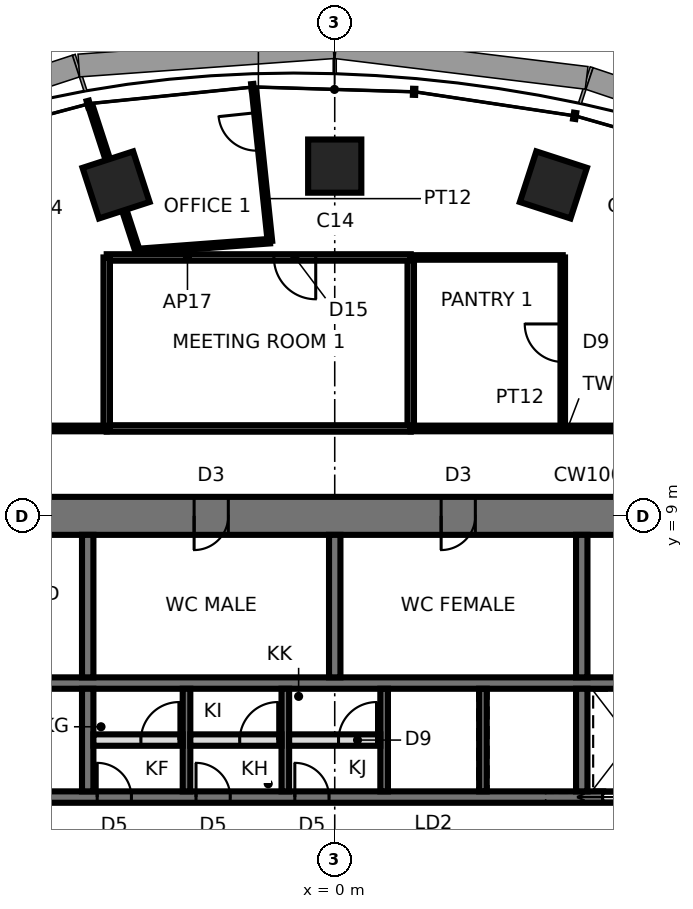
"""IFC4 building model, lengths in metres.
Left out: names, types, materials, properties, quantities, classifications, styles, units other than length and angle.
Written with IfcOpenShell. Run it as: python <this file> out.ifc"""

import sys

from ifc_helpers import new_model, si_unit, direction, frame, frame_2d, origin, origin_2d, place, context, subcontext, project, spatial, rectangle, extrude, element, fill, save


model = new_model("IFC4")
c1 = context("Model", 3, precision=1e-05, world=origin(), true_north=direction((0.0, 1.0)))
c2 = subcontext(c1, "Body", "Model", "MODEL_VIEW")
j1 = project(units=[si_unit("LENGTHUNIT", "METRE"), si_unit("PLANEANGLEUNIT", "RADIAN")], contexts=[c1])
p1 = place(None, origin())
s1 = spatial("IfcSite", under=j1, at=p1, CompositionType="ELEMENT")
p2 = place(p1, origin())
s2 = spatial("IfcBuilding", under=s1, at=p2, CompositionType="ELEMENT")
p3 = place(p2, frame((0.0, 0.0, 226.7)))
s3 = spatial("IfcBuildingStorey", under=s2, at=p3, CompositionType="ELEMENT", Elevation=226.7)
for number, where, z_axis, x_axis in (
    (1, (5.754, 17.708, 0.0), (0.0, 0.0, 1.0), (0.309, 0.951, 0.0)),
    (2, (0.0, 18.204, 0.0), (0.0, 0.0, 1.0), (0.0, 1.0, 0.0)),
    (3, (-5.754, 17.708, 0.0), (0.0, 0.0, 1.0), (-0.309, 0.951, 0.0)),
):
    element("IfcColumn", number, at=place(p3, frame(where, z_axis=z_axis, x_axis=x_axis)), inside=s3, PredefinedType="COLUMN", context=c2, shape_type="SweptSolid", body=[
        extrude(rectangle(XDim=1.4, YDim=1.4, at=origin_2d()), origin(), (0.0, 0.0, 1.0), 3.9),
    ])
p4 = place(p3, frame((13.2, 9.0, 0.0), z_axis=(0.0, 0.0, 1.0), x_axis=(-1.0, 0.0, 0.0)))
e4 = element("IfcWall", 4, at=p4, inside=s3, PredefinedType="SHEAR", context=c2, shape_type="SweptSolid", body=[
    extrude(rectangle(XDim=26.4, YDim=1.0, at=frame_2d((13.2, 0.0))), origin(), (0.0, 0.0, 1.0), 3.9),
])
p5 = place(p4, frame((2.65, 0.0, 0.0)))
e5 = element("IfcOpeningElement", 5, at=p5, cuts=e4, PredefinedType="OPENING", context=c2, shape_type="SweptSolid", body=[
    extrude(rectangle(XDim=0.9, YDim=2.1, at=frame_2d((0.45, 1.05))), frame((0.0, 0.51, 0.0), z_axis=(0.0, -1.0, 0.0), x_axis=(1.0, 0.0, 0.0)), (0.0, 0.0, 1.0), 1.02),
])
p6 = place(p4, frame((9.5, 0.0, 0.0)))
e6 = element("IfcOpeningElement", 6, at=p6, cuts=e4, PredefinedType="OPENING", context=c2, shape_type="SweptSolid", body=[
    extrude(rectangle(XDim=0.9, YDim=2.1, at=frame_2d((0.45, 1.05))), frame((0.0, 0.51, 0.0), z_axis=(0.0, -1.0, 0.0), x_axis=(1.0, 0.0, 0.0)), (0.0, 0.0, 1.0), 1.02),
])
p7 = place(p4, frame((16.0, 0.0, 0.0)))
e7 = element("IfcOpeningElement", 7, at=p7, cuts=e4, PredefinedType="OPENING", context=c2, shape_type="SweptSolid", body=[
    extrude(rectangle(XDim=0.9, YDim=2.1, at=frame_2d((0.45, 1.05))), frame((0.0, 0.51, 0.0), z_axis=(0.0, -1.0, 0.0), x_axis=(1.0, 0.0, 0.0)), (0.0, 0.0, 1.0), 1.02),
])
p8 = place(p4, frame((21.25, 0.0, 0.0)))
e8 = element("IfcOpeningElement", 8, at=p8, cuts=e4, PredefinedType="OPENING", context=c2, shape_type="SweptSolid", body=[
    extrude(rectangle(XDim=0.9, YDim=2.1, at=frame_2d((0.45, 1.05))), frame((0.0, 0.51, 0.0), z_axis=(0.0, -1.0, 0.0), x_axis=(1.0, 0.0, 0.0)), (0.0, 0.0, 1.0), 1.02),
])
p9 = place(p4, frame((24.8, 0.0, 0.0)))
e9 = element("IfcOpeningElement", 9, at=p9, cuts=e4, PredefinedType="OPENING", context=c2, shape_type="SweptSolid", body=[
    extrude(rectangle(XDim=1.0, YDim=2.1, at=frame_2d((0.5, 1.05))), frame((0.0, 0.51, 0.0), z_axis=(0.0, -1.0, 0.0), x_axis=(1.0, 0.0, 0.0)), (0.0, 0.0, 1.0), 1.02),
])
p10 = place(p3, frame((-13.2, 1.6, 0.0), z_axis=(0.0, 0.0, 1.0), x_axis=(1.0, 0.0, 0.0)))
e10 = element("IfcWall", 10, at=p10, inside=s3, PredefinedType="SHEAR", context=c2, shape_type="SweptSolid", body=[
    extrude(rectangle(XDim=26.4, YDim=0.3, at=frame_2d((13.2, 0.0))), origin(), (0.0, 0.0, 1.0), 3.9),
])
p11 = place(p10, frame((0.25, 0.0, 0.0)))
e11 = element("IfcOpeningElement", 11, at=p11, cuts=e10, PredefinedType="OPENING", context=c2, shape_type="SweptSolid", body=[
    extrude(rectangle(XDim=1.0, YDim=2.1, at=frame_2d((0.5, 1.05))), frame((0.0, 0.16, 0.0), z_axis=(0.0, -1.0, 0.0), x_axis=(1.0, 0.0, 0.0)), (0.0, 0.0, 1.0), 0.32),
])
p12 = place(p10, frame((23.05, 0.0, 0.0)))
e12 = element("IfcOpeningElement", 12, at=p12, cuts=e10, PredefinedType="OPENING", context=c2, shape_type="SweptSolid", body=[
    extrude(rectangle(XDim=1.1, YDim=2.3, at=frame_2d((0.55, 1.15))), frame((0.0, 0.16, 0.0), z_axis=(0.0, -1.0, 0.0), x_axis=(1.0, 0.0, 0.0)), (0.0, 0.0, 1.0), 0.32),
])
p13 = place(p10, frame((20.25, 0.0, 0.0)))
e13 = element("IfcOpeningElement", 13, at=p13, cuts=e10, PredefinedType="OPENING", context=c2, shape_type="SweptSolid", body=[
    extrude(rectangle(XDim=1.5, YDim=2.4, at=frame_2d((0.75, 1.2))), frame((0.0, 0.16, 0.0), z_axis=(0.0, -1.0, 0.0), x_axis=(1.0, 0.0, 0.0)), (0.0, 0.0, 1.0), 0.32),
])
p14 = place(p10, frame((6.95, 0.0, 0.0)))
e14 = element("IfcOpeningElement", 14, at=p14, cuts=e10, PredefinedType="OPENING", context=c2, shape_type="SweptSolid", body=[
    extrude(rectangle(XDim=0.9, YDim=2.1, at=frame_2d((0.45, 1.05))), frame((0.0, 0.16, 0.0), z_axis=(0.0, -1.0, 0.0), x_axis=(1.0, 0.0, 0.0)), (0.0, 0.0, 1.0), 0.32),
])
p15 = place(p10, frame((9.55, 0.0, 0.0)))
e15 = element("IfcOpeningElement", 15, at=p15, cuts=e10, PredefinedType="OPENING", context=c2, shape_type="SweptSolid", body=[
    extrude(rectangle(XDim=0.9, YDim=2.1, at=frame_2d((0.45, 1.05))), frame((0.0, 0.16, 0.0), z_axis=(0.0, -1.0, 0.0), x_axis=(1.0, 0.0, 0.0)), (0.0, 0.0, 1.0), 0.32),
])
p16 = place(p10, frame((12.15, 0.0, 0.0)))
e16 = element("IfcOpeningElement", 16, at=p16, cuts=e10, PredefinedType="OPENING", context=c2, shape_type="SweptSolid", body=[
    extrude(rectangle(XDim=0.9, YDim=2.1, at=frame_2d((0.45, 1.05))), frame((0.0, 0.16, 0.0), z_axis=(0.0, -1.0, 0.0), x_axis=(1.0, 0.0, 0.0)), (0.0, 0.0, 1.0), 0.32),
])
p17 = place(p10, frame((25.45, 0.0, 0.0)))
e17 = element("IfcOpeningElement", 17, at=p17, cuts=e10, PredefinedType="OPENING", context=c2, shape_type="SweptSolid", body=[
    extrude(rectangle(XDim=0.9, YDim=2.1, at=frame_2d((0.45, 1.05))), frame((0.0, 0.16, 0.0), z_axis=(0.0, -1.0, 0.0), x_axis=(1.0, 0.0, 0.0)), (0.0, 0.0, 1.0), 0.32),
])
p18 = place(p3, frame((-13.2, 4.6, 0.0), z_axis=(0.0, 0.0, 1.0), x_axis=(1.0, 0.0, 0.0)))
e18 = element("IfcWall", 18, at=p18, inside=s3, PredefinedType="SHEAR", context=c2, shape_type="SweptSolid", body=[
    extrude(rectangle(XDim=26.4, YDim=0.3, at=frame_2d((13.2, 0.0))), origin(), (0.0, 0.0, 1.0), 3.9),
])
p19 = place(p3, frame((-6.5, 1.75, 0.0), z_axis=(0.0, 0.0, 1.0), x_axis=(0.0, 1.0, 0.0)))
e19 = element("IfcWall", 19, at=p19, inside=s3, PredefinedType="SHEAR", context=c2, shape_type="SweptSolid", body=[
    extrude(rectangle(XDim=2.7, YDim=0.3, at=frame_2d((1.35, 0.0))), origin(), (0.0, 0.0, 1.0), 3.9),
])
p20 = place(p3, frame((-6.5, 4.75, 0.0), z_axis=(0.0, 0.0, 1.0), x_axis=(0.0, 1.0, 0.0)))
e20 = element("IfcWall", 20, at=p20, inside=s3, PredefinedType="SHEAR", context=c2, shape_type="SweptSolid", body=[
    extrude(rectangle(XDim=3.75, YDim=0.3, at=frame_2d((1.875, 0.0))), origin(), (0.0, 0.0, 1.0), 3.9),
])
p21 = place(p3, frame((6.5, 1.75, 0.0), z_axis=(0.0, 0.0, 1.0), x_axis=(0.0, 1.0, 0.0)))
e21 = element("IfcWall", 21, at=p21, inside=s3, PredefinedType="SHEAR", context=c2, shape_type="SweptSolid", body=[
    extrude(rectangle(XDim=2.7, YDim=0.3, at=frame_2d((1.35, 0.0))), origin(), (0.0, 0.0, 1.0), 3.9),
])
p22 = place(p3, frame((6.5, 4.75, 0.0), z_axis=(0.0, 0.0, 1.0), x_axis=(0.0, 1.0, 0.0)))
e22 = element("IfcWall", 22, at=p22, inside=s3, PredefinedType="SHEAR", context=c2, shape_type="SweptSolid", body=[
    extrude(rectangle(XDim=3.75, YDim=0.3, at=frame_2d((1.875, 0.0))), origin(), (0.0, 0.0, 1.0), 3.9),
])
for number, where, z_axis, x_axis in (
    (23, (-3.9, 1.75, 0.0), (0.0, 0.0, 1.0), (0.0, 1.0, 0.0)),
    (24, (-1.3, 1.75, 0.0), (0.0, 0.0, 1.0), (0.0, 1.0, 0.0)),
    (25, (1.3, 1.75, 0.0), (0.0, 0.0, 1.0), (0.0, 1.0, 0.0)),
    (26, (3.9, 1.75, 0.0), (0.0, 0.0, 1.0), (0.0, 1.0, 0.0)),
):
    element("IfcWall", number, at=place(p3, frame(where, z_axis=z_axis, x_axis=x_axis)), inside=s3, PredefinedType="SHEAR", context=c2, shape_type="SweptSolid", body=[
        extrude(rectangle(XDim=2.7, YDim=0.2, at=frame_2d((1.35, 0.0))), origin(), (0.0, 0.0, 1.0), 3.9),
    ])
p23 = place(p3, frame((0.0, 4.75, 0.0), z_axis=(0.0, 0.0, 1.0), x_axis=(0.0, 1.0, 0.0)))
e27 = element("IfcWall", 27, at=p23, inside=s3, PredefinedType="SHEAR", context=c2, shape_type="SweptSolid", body=[
    extrude(rectangle(XDim=3.75, YDim=0.3, at=frame_2d((1.875, 0.0))), origin(), (0.0, 0.0, 1.0), 3.9),
])
p24 = place(p3, frame((-6.35, 3.1, 0.0), z_axis=(0.0, 0.0, 1.0), x_axis=(1.0, 0.0, 0.0)))
e28 = element("IfcWall", 28, at=p24, inside=s3, PredefinedType="PARTITIONING", context=c2, shape_type="SweptSolid", body=[
    extrude(rectangle(XDim=2.35, YDim=0.3, at=frame_2d((1.175, 0.0))), origin(), (0.0, 0.0, 1.0), 3.74),
])
p25 = place(p24, frame((1.25, 0.0, 0.0)))
e29 = element("IfcOpeningElement", 29, at=p25, cuts=e28, PredefinedType="OPENING", context=c2, shape_type="SweptSolid", body=[
    extrude(rectangle(XDim=1.0, YDim=2.4, at=frame_2d((0.5, 1.2))), frame((0.0, 0.16, 0.0), z_axis=(0.0, -1.0, 0.0), x_axis=(1.0, 0.0, 0.0)), (0.0, 0.0, 1.0), 0.32),
])
p26 = place(p3, frame((-3.8, 3.1, 0.0), z_axis=(0.0, 0.0, 1.0), x_axis=(1.0, 0.0, 0.0)))
e30 = element("IfcWall", 30, at=p26, inside=s3, PredefinedType="PARTITIONING", context=c2, shape_type="SweptSolid", body=[
    extrude(rectangle(XDim=2.4, YDim=0.3, at=frame_2d((1.2, 0.0))), origin(), (0.0, 0.0, 1.0), 3.74),
])
p27 = place(p26, frame((1.3, 0.0, 0.0)))
e31 = element("IfcOpeningElement", 31, at=p27, cuts=e30, PredefinedType="OPENING", context=c2, shape_type="SweptSolid", body=[
    extrude(rectangle(XDim=1.0, YDim=2.4, at=frame_2d((0.5, 1.2))), frame((0.0, 0.16, 0.0), z_axis=(0.0, -1.0, 0.0), x_axis=(1.0, 0.0, 0.0)), (0.0, 0.0, 1.0), 0.32),
])
p28 = place(p3, frame((-1.2, 3.1, 0.0), z_axis=(0.0, 0.0, 1.0), x_axis=(1.0, 0.0, 0.0)))
e32 = element("IfcWall", 32, at=p28, inside=s3, PredefinedType="PARTITIONING", context=c2, shape_type="SweptSolid", body=[
    extrude(rectangle(XDim=2.4, YDim=0.3, at=frame_2d((1.2, 0.0))), origin(), (0.0, 0.0, 1.0), 3.74),
])
p29 = place(p28, frame((1.3, 0.0, 0.0)))
e33 = element("IfcOpeningElement", 33, at=p29, cuts=e32, PredefinedType="OPENING", context=c2, shape_type="SweptSolid", body=[
    extrude(rectangle(XDim=1.0, YDim=2.4, at=frame_2d((0.5, 1.2))), frame((0.0, 0.16, 0.0), z_axis=(0.0, -1.0, 0.0), x_axis=(1.0, 0.0, 0.0)), (0.0, 0.0, 1.0), 0.32),
])
p30 = place(p3, frame((16.0, 11.3, 0.0), z_axis=(0.0, 0.0, 1.0), x_axis=(-1.0, 0.0, 0.0)))
e34 = element("IfcWall", 34, at=p30, inside=s3, PredefinedType="PARTITIONING", context=c2, shape_type="SweptSolid", body=[
    extrude(rectangle(XDim=14.0, YDim=0.15, at=frame_2d((7.0, 0.0))), origin(), (0.0, 0.0, 1.0), 3.74),
])
p31 = place(p30, frame((4.4, 0.0, 0.0)))
e35 = element("IfcOpeningElement", 35, at=p31, cuts=e34, PredefinedType="OPENING", context=c2, shape_type="SweptSolid", body=[
    extrude(rectangle(XDim=1.2, YDim=2.4, at=frame_2d((0.6, 1.2))), frame((0.0, 0.085, 0.0), z_axis=(0.0, -1.0, 0.0), x_axis=(1.0, 0.0, 0.0)), (0.0, 0.0, 1.0), 0.17),
])
p32 = place(p3, frame((6.0, 11.3, 0.0), z_axis=(0.0, 0.0, 1.0), x_axis=(0.0, 1.0, 0.0)))
e36 = element("IfcWall", 36, at=p32, inside=s3, PredefinedType="PARTITIONING", context=c2, shape_type="SweptSolid", body=[
    extrude(rectangle(XDim=4.5, YDim=0.12, at=frame_2d((2.25, 0.0))), origin(), (0.0, 0.0, 1.0), 3.74),
])
p33 = place(p32, frame((1.75, 0.0, 0.0)))
e37 = element("IfcOpeningElement", 37, at=p33, cuts=e36, PredefinedType="OPENING", context=c2, shape_type="SweptSolid", body=[
    extrude(rectangle(XDim=1.0, YDim=2.4, at=frame_2d((0.5, 1.2))), frame((0.0, 0.07, 0.0), z_axis=(0.0, -1.0, 0.0), x_axis=(1.0, 0.0, 0.0)), (0.0, 0.0, 1.0), 0.14),
])
p34 = place(p3, frame((6.0, 15.8, 0.0), z_axis=(0.0, 0.0, 1.0), x_axis=(-1.0, 0.0, 0.0)))
e38 = element("IfcWall", 38, at=p34, inside=s3, PredefinedType="PARTITIONING", context=c2, shape_type="SweptSolid", body=[
    extrude(rectangle(XDim=4.0, YDim=0.12, at=frame_2d((2.0, 0.0))), origin(), (0.0, 0.0, 1.0), 3.74),
])
p35 = place(p3, frame((2.0, 15.8, 0.0), z_axis=(0.0, 0.0, 1.0), x_axis=(0.0, -1.0, 0.0)))
e39 = element("IfcWall", 39, at=p35, inside=s3, PredefinedType="PARTITIONING", context=c2, shape_type="SweptSolid", body=[
    extrude(rectangle(XDim=4.5, YDim=0.17, at=frame_2d((2.25, 0.0))), origin(), (0.0, 0.0, 1.0), 3.74),
])
p36 = place(p3, frame((-1.706, 16.229, 0.0), z_axis=(0.0, 0.0, 1.0), x_axis=(-0.104494148666, 0.99452550138, 0.0)))
e40 = element("IfcWall", 40, at=p36, inside=s3, PredefinedType="PARTITIONING", context=c2, shape_type="SweptSolid", body=[
    extrude(rectangle(XDim=4.0, YDim=0.12, at=frame_2d((2.0, 0.0))), origin(), (0.0, 0.0, 1.0), 3.74),
])
p37 = place(p36, frame((2.4, 0.0, 0.0)))
e41 = element("IfcOpeningElement", 41, at=p37, cuts=e40, PredefinedType="OPENING", context=c2, shape_type="SweptSolid", body=[
    extrude(rectangle(XDim=1.0, YDim=2.4, at=frame_2d((0.5, 1.2))), frame((0.0, 0.07, 0.0), z_axis=(0.0, -1.0, 0.0), x_axis=(1.0, 0.0, 0.0)), (0.0, 0.0, 1.0), 0.14),
])
p38 = place(p3, frame((2.0, 15.8, 0.0), z_axis=(0.0, 0.0, 1.0), x_axis=(-1.0, 0.0, 0.0)))
e42 = element("IfcWall", 42, at=p38, inside=s3, PredefinedType="PARTITIONING", context=c2, shape_type="SweptSolid", body=[
    extrude(rectangle(XDim=8.0, YDim=0.17, at=frame_2d((4.0, 0.0))), origin(), (0.0, 0.0, 1.0), 3.74),
])
p39 = place(p38, frame((2.5, 0.0, 0.0)))
e43 = element("IfcOpeningElement", 43, at=p39, cuts=e42, PredefinedType="OPENING", context=c2, shape_type="SweptSolid", body=[
    extrude(rectangle(XDim=1.1, YDim=2.4, at=frame_2d((0.55, 1.2))), frame((0.0, 0.095, 0.0), z_axis=(0.0, -1.0, 0.0), x_axis=(1.0, 0.0, 0.0)), (0.0, 0.0, 1.0), 0.19),
])
p40 = place(p3, frame((-6.0, 11.3, 0.0), z_axis=(0.0, 0.0, 1.0), x_axis=(1.0, 0.0, 0.0)))
e44 = element("IfcWall", 44, at=p40, inside=s3, PredefinedType="PARTITIONING", context=c2, shape_type="SweptSolid", body=[
    extrude(rectangle(XDim=8.0, YDim=0.17, at=frame_2d((4.0, 0.0))), origin(), (0.0, 0.0, 1.0), 3.74),
])
p41 = place(p3, frame((-5.188, 15.969, 0.0), z_axis=(0.0, 0.0, 1.0), x_axis=(0.997219476507, 0.074520572167, 0.0)))
e45 = element("IfcWall", 45, at=p41, inside=s3, PredefinedType="PARTITIONING", context=c2, shape_type="SweptSolid", body=[
    extrude(rectangle(XDim=3.492, YDim=0.12, at=frame_2d((1.746, 0.0))), origin(), (0.0, 0.0, 1.0), 3.74),
])
p42 = place(p3, frame((-6.425, 19.773, 0.0), z_axis=(0.0, 0.0, 1.0), x_axis=(0.309022586479, -0.951054699292, 0.0)))
e46 = element("IfcWall", 46, at=p42, inside=s3, PredefinedType="PARTITIONING", context=c2, shape_type="SweptSolid", body=[
    extrude(rectangle(XDim=4.0, YDim=0.12, at=frame_2d((2.0, 0.0))), origin(), (0.0, 0.0, 1.0), 3.04),
])
p43 = place(p3, frame((-6.0, 15.8, 0.0), z_axis=(0.0, 0.0, 1.0), x_axis=(0.0, -1.0, 0.0)))
e47 = element("IfcWall", 47, at=p43, inside=s3, PredefinedType="PARTITIONING", context=c2, shape_type="SweptSolid", body=[
    extrude(rectangle(XDim=4.5, YDim=0.17, at=frame_2d((2.25, 0.0))), origin(), (0.0, 0.0, 1.0), 3.74),
])
p44 = place(p3, frame((-6.0, 11.3, 0.0), z_axis=(0.0, 0.0, 1.0), x_axis=(-1.0, 0.0, 0.0)))
e48 = element("IfcWall", 48, at=p44, inside=s3, PredefinedType="PARTITIONING", context=c2, shape_type="SweptSolid", body=[
    extrude(rectangle(XDim=10.0, YDim=0.15, at=frame_2d((5.0, 0.0))), origin(), (0.0, 0.0, 1.0), 3.74),
])
p45 = place(p13, origin())
e49 = element("IfcDoor", 49, at=p45, inside=s3, OperationType="SLIDING_TO_LEFT", PredefinedType="DOOR", context=c2, shape_type="SweptSolid", body=[
    extrude(rectangle(XDim=1.5, YDim=2.4, at=frame_2d((0.75, 1.2))), frame((0.0, 0.025, 0.0), z_axis=(0.0, -1.0, 0.0), x_axis=(1.0, 0.0, 0.0)), (0.0, 0.0, 1.0), 0.05),
])
fill(e13, e49)
p46 = place(p25, origin())
e50 = element("IfcDoor", 50, at=p46, inside=s3, OperationType="SINGLE_SWING_RIGHT", PredefinedType="DOOR", context=c2, shape_type="SweptSolid", body=[
    extrude(rectangle(XDim=1.0, YDim=2.4, at=frame_2d((0.5, 1.2))), frame((0.0, 0.025, 0.0), z_axis=(0.0, -1.0, 0.0), x_axis=(1.0, 0.0, 0.0)), (0.0, 0.0, 1.0), 0.05),
])
fill(e29, e50)
p47 = place(p14, origin())
e51 = element("IfcDoor", 51, at=p47, inside=s3, OperationType="SINGLE_SWING_LEFT", PredefinedType="DOOR", context=c2, shape_type="SweptSolid", body=[
    extrude(rectangle(XDim=0.9, YDim=2.1, at=frame_2d((0.45, 1.05))), frame((0.0, 0.025, 0.0), z_axis=(0.0, -1.0, 0.0), x_axis=(1.0, 0.0, 0.0)), (0.0, 0.0, 1.0), 0.05),
])
fill(e14, e51)
p48 = place(p27, origin())
e52 = element("IfcDoor", 52, at=p48, inside=s3, OperationType="SINGLE_SWING_RIGHT", PredefinedType="DOOR", context=c2, shape_type="SweptSolid", body=[
    extrude(rectangle(XDim=1.0, YDim=2.4, at=frame_2d((0.5, 1.2))), frame((0.0, 0.025, 0.0), z_axis=(0.0, -1.0, 0.0), x_axis=(1.0, 0.0, 0.0)), (0.0, 0.0, 1.0), 0.05),
])
fill(e31, e52)
p49 = place(p15, origin())
e53 = element("IfcDoor", 53, at=p49, inside=s3, OperationType="SINGLE_SWING_LEFT", PredefinedType="DOOR", context=c2, shape_type="SweptSolid", body=[
    extrude(rectangle(XDim=0.9, YDim=2.1, at=frame_2d((0.45, 1.05))), frame((0.0, 0.025, 0.0), z_axis=(0.0, -1.0, 0.0), x_axis=(1.0, 0.0, 0.0)), (0.0, 0.0, 1.0), 0.05),
])
fill(e15, e53)
p50 = place(p29, origin())
e54 = element("IfcDoor", 54, at=p50, inside=s3, OperationType="SINGLE_SWING_RIGHT", PredefinedType="DOOR", context=c2, shape_type="SweptSolid", body=[
    extrude(rectangle(XDim=1.0, YDim=2.4, at=frame_2d((0.5, 1.2))), frame((0.0, 0.025, 0.0), z_axis=(0.0, -1.0, 0.0), x_axis=(1.0, 0.0, 0.0)), (0.0, 0.0, 1.0), 0.05),
])
fill(e33, e54)
p51 = place(p16, origin())
e55 = element("IfcDoor", 55, at=p51, inside=s3, OperationType="SINGLE_SWING_LEFT", PredefinedType="DOOR", context=c2, shape_type="SweptSolid", body=[
    extrude(rectangle(XDim=0.9, YDim=2.1, at=frame_2d((0.45, 1.05))), frame((0.0, 0.025, 0.0), z_axis=(0.0, -1.0, 0.0), x_axis=(1.0, 0.0, 0.0)), (0.0, 0.0, 1.0), 0.05),
])
fill(e16, e55)
p52 = place(p6, origin())
e56 = element("IfcDoor", 56, at=p52, inside=s3, OperationType="SINGLE_SWING_RIGHT", PredefinedType="DOOR", context=c2, shape_type="SweptSolid", body=[
    extrude(rectangle(XDim=0.82, YDim=2.06, at=frame_2d((0.45, 1.03))), frame((0.0, 0.025, 0.0), z_axis=(0.0, -1.0, 0.0), x_axis=(1.0, 0.0, 0.0)), (0.0, 0.0, 1.0), 0.05),
    extrude(rectangle(XDim=0.04, YDim=2.1, at=frame_2d((0.02, 1.05))), frame((0.0, 0.25, 0.0), z_axis=(0.0, -1.0, 0.0), x_axis=(1.0, 0.0, 0.0)), (0.0, 0.0, 1.0), 0.5),
    extrude(rectangle(XDim=0.04, YDim=2.1, at=frame_2d((0.88, 1.05))), frame((0.0, 0.25, 0.0), z_axis=(0.0, -1.0, 0.0), x_axis=(1.0, 0.0, 0.0)), (0.0, 0.0, 1.0), 0.5),
    extrude(rectangle(XDim=0.82, YDim=0.04, at=frame_2d((0.45, 2.08))), frame((0.0, 0.25, 0.0), z_axis=(0.0, -1.0, 0.0), x_axis=(1.0, 0.0, 0.0)), (0.0, 0.0, 1.0), 0.5),
])
fill(e6, e56)
p53 = place(p7, origin())
e57 = element("IfcDoor", 57, at=p53, inside=s3, OperationType="SINGLE_SWING_RIGHT", PredefinedType="DOOR", context=c2, shape_type="SweptSolid", body=[
    extrude(rectangle(XDim=0.82, YDim=2.06, at=frame_2d((0.45, 1.03))), frame((0.0, 0.025, 0.0), z_axis=(0.0, -1.0, 0.0), x_axis=(1.0, 0.0, 0.0)), (0.0, 0.0, 1.0), 0.05),
    extrude(rectangle(XDim=0.04, YDim=2.1, at=frame_2d((0.02, 1.05))), frame((0.0, 0.25, 0.0), z_axis=(0.0, -1.0, 0.0), x_axis=(1.0, 0.0, 0.0)), (0.0, 0.0, 1.0), 0.5),
    extrude(rectangle(XDim=0.04, YDim=2.1, at=frame_2d((0.88, 1.05))), frame((0.0, 0.25, 0.0), z_axis=(0.0, -1.0, 0.0), x_axis=(1.0, 0.0, 0.0)), (0.0, 0.0, 1.0), 0.5),
    extrude(rectangle(XDim=0.82, YDim=0.04, at=frame_2d((0.45, 2.08))), frame((0.0, 0.25, 0.0), z_axis=(0.0, -1.0, 0.0), x_axis=(1.0, 0.0, 0.0)), (0.0, 0.0, 1.0), 0.5),
])
fill(e7, e57)
p54 = place(p37, origin())
e58 = element("IfcDoor", 58, at=p54, inside=s3, OperationType="SINGLE_SWING_RIGHT", PredefinedType="DOOR", context=c2, shape_type="SweptSolid", body=[
    extrude(rectangle(XDim=1.0, YDim=2.4, at=frame_2d((0.5, 1.2))), frame((0.0, 0.025, 0.0), z_axis=(0.0, -1.0, 0.0), x_axis=(1.0, 0.0, 0.0)), (0.0, 0.0, 1.0), 0.05),
])
fill(e41, e58)
p55 = place(p39, origin())
e59 = element("IfcDoor", 59, at=p55, inside=s3, OperationType="SINGLE_SWING_LEFT", PredefinedType="DOOR", context=c2, shape_type="SweptSolid", body=[
    extrude(rectangle(XDim=1.1, YDim=2.4, at=frame_2d((0.55, 1.2))), frame((0.0, 0.025, 0.0), z_axis=(0.0, -1.0, 0.0), x_axis=(1.0, 0.0, 0.0)), (0.0, 0.0, 1.0), 0.05),
])
fill(e43, e59)
p56 = place(p33, origin())
e60 = element("IfcDoor", 60, at=p56, inside=s3, OperationType="SINGLE_SWING_RIGHT", PredefinedType="DOOR", context=c2, shape_type="SweptSolid", body=[
    extrude(rectangle(XDim=1.0, YDim=2.4, at=frame_2d((0.5, 1.2))), frame((0.0, 0.025, 0.0), z_axis=(0.0, -1.0, 0.0), x_axis=(1.0, 0.0, 0.0)), (0.0, 0.0, 1.0), 0.05),
])
fill(e37, e60)
save(model, sys.argv[1])
